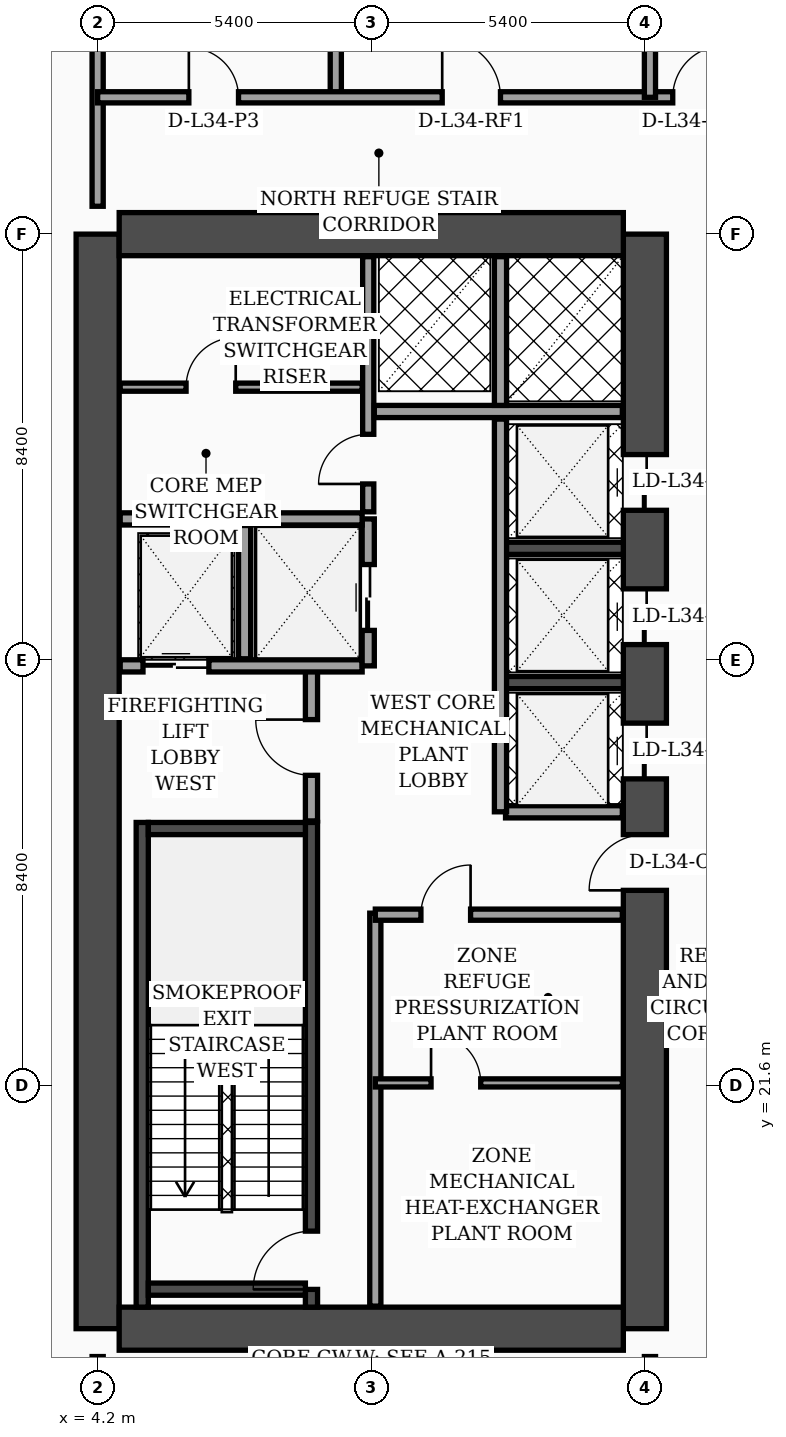
"""IFC4 building model, lengths in metres.
Left out: names, types, materials, properties, quantities, classifications, styles, units other than length and angle.
Written with IfcOpenShell. Run it as: python <this file> out.ifc"""

import sys

from ifc_helpers import new_model, si_unit, direction, frame, frame_2d, origin, place, context, subcontext, project, spatial, rectangle, extrude, element, fill, save


model = new_model("IFC4")
c1 = context("Model", 3, precision=1e-05, world=origin(), true_north=direction((0.0, 1.0)))
c2 = subcontext(c1, "Body", "Model", "MODEL_VIEW")
j1 = project(units=[si_unit("LENGTHUNIT", "METRE"), si_unit("PLANEANGLEUNIT", "RADIAN")], contexts=[c1])
p1 = place(None, origin())
s1 = spatial("IfcSite", under=j1, at=p1, CompositionType="ELEMENT")
p2 = place(p1, origin())
s2 = spatial("IfcBuilding", under=s1, at=p2, CompositionType="ELEMENT")
p3 = place(p2, frame((0.0, 0.0, 139.2)))
s3 = spatial("IfcBuildingStorey", under=s2, at=p3, CompositionType="ELEMENT", Elevation=139.2)
p4 = place(p3, frame((4.2, 16.8, 0.0), z_axis=(0.0, 0.0, 1.0), x_axis=(0.0, 1.0, 0.0)))
e1 = element("IfcWall", 1, at=p4, inside=s3, PredefinedType="SHEAR", context=c2, shape_type="SweptSolid", body=[
    extrude(rectangle(XDim=21.6, YDim=0.85, at=frame_2d((10.8, 0.0))), origin(), (0.0, 0.0, 1.0), 4.56),
])
p5 = place(p3, frame((15.0, 16.8, 0.0), z_axis=(0.0, 0.0, 1.0), x_axis=(0.0, 1.0, 0.0)))
e2 = element("IfcWall", 2, at=p5, inside=s3, PredefinedType="SHEAR", context=c2, shape_type="SweptSolid", body=[
    extrude(rectangle(XDim=21.6, YDim=0.85, at=frame_2d((10.8, 0.0))), origin(), (0.0, 0.0, 1.0), 4.56),
])
p6 = place(p5, frame((8.65, 0.0, 0.0)))
e3 = element("IfcOpeningElement", 3, at=p6, cuts=e2, PredefinedType="OPENING", context=c2, shape_type="SweptSolid", body=[
    extrude(rectangle(XDim=1.1, YDim=2.2, at=frame_2d((0.55, 1.1))), frame((0.0, 0.435, 0.0), z_axis=(0.0, -1.0, 0.0), x_axis=(1.0, 0.0, 0.0)), (0.0, 0.0, 1.0), 0.87),
])
p7 = place(p5, frame((10.85, 0.0, 0.0)))
e4 = element("IfcOpeningElement", 4, at=p7, cuts=e2, PredefinedType="OPENING", context=c2, shape_type="SweptSolid", body=[
    extrude(rectangle(XDim=1.1, YDim=2.2, at=frame_2d((0.55, 1.1))), frame((0.0, 0.435, 0.0), z_axis=(0.0, -1.0, 0.0), x_axis=(1.0, 0.0, 0.0)), (0.0, 0.0, 1.0), 0.87),
])
p8 = place(p5, frame((13.5, 0.0, 0.0)))
e5 = element("IfcOpeningElement", 5, at=p8, cuts=e2, PredefinedType="OPENING", context=c2, shape_type="SweptSolid", body=[
    extrude(rectangle(XDim=1.1, YDim=2.2, at=frame_2d((0.55, 1.1))), frame((0.0, 0.435, 0.0), z_axis=(0.0, -1.0, 0.0), x_axis=(1.0, 0.0, 0.0)), (0.0, 0.0, 1.0), 0.87),
])
p9 = place(p5, frame((16.15, 0.0, 0.0)))
e6 = element("IfcOpeningElement", 6, at=p9, cuts=e2, PredefinedType="OPENING", context=c2, shape_type="SweptSolid", body=[
    extrude(rectangle(XDim=1.1, YDim=2.2, at=frame_2d((0.55, 1.1))), frame((0.0, 0.435, 0.0), z_axis=(0.0, -1.0, 0.0), x_axis=(1.0, 0.0, 0.0)), (0.0, 0.0, 1.0), 0.87),
])
for number, where, z_axis, x_axis in (
    (7, (4.625, 38.4, 0.0), (0.0, 0.0, 1.0), (1.0, 0.0, 0.0)),
    (8, (4.625, 16.8, 0.0), (0.0, 0.0, 1.0), (1.0, 0.0, 0.0)),
):
    element("IfcWall", number, at=place(p3, frame(where, z_axis=z_axis, x_axis=x_axis)), inside=s3, PredefinedType="SHEAR", context=c2, shape_type="SweptSolid", body=[
        extrude(rectangle(XDim=9.95, YDim=0.85, at=frame_2d((4.975, 0.0))), origin(), (0.0, 0.0, 1.0), 4.56),
    ])
p10 = place(p3, frame((5.08, 17.225, 0.0), z_axis=(0.0, 0.0, 1.0), x_axis=(0.0, 1.0, 0.0)))
e9 = element("IfcWall", 9, at=p10, inside=s3, PredefinedType="SOLIDWALL", context=c2, shape_type="SweptSolid", body=[
    extrude(rectangle(XDim=9.565, YDim=0.24, at=frame_2d((4.782, 0.0))), origin(), (0.0, 0.0, 1.0), 4.56),
])
p11 = place(p3, frame((8.42, 17.225, 0.0), z_axis=(0.0, 0.0, 1.0), x_axis=(0.0, 1.0, 0.0)))
e10 = element("IfcWall", 10, at=p11, inside=s3, PredefinedType="SOLIDWALL", context=c2, shape_type="SweptSolid", body=[
    extrude(rectangle(XDim=9.565, YDim=0.24, at=frame_2d((4.782, 0.0))), origin(), (0.0, 0.0, 1.0), 4.56),
])
p12 = place(p11, frame((0.35, 0.0, 0.0)))
e11 = element("IfcOpeningElement", 11, at=p12, cuts=e10, PredefinedType="OPENING", context=c2, shape_type="SweptSolid", body=[
    extrude(rectangle(XDim=1.15, YDim=2.2, at=frame_2d((0.575, 1.1))), frame((0.0, 0.13, 0.0), z_axis=(0.0, -1.0, 0.0), x_axis=(1.0, 0.0, 0.0)), (0.0, 0.0, 1.0), 0.26),
])
for number, where, z_axis, x_axis in (
    (12, (5.2, 17.58, 0.0), (0.0, 0.0, 1.0), (1.0, 0.0, 0.0)),
    (13, (5.2, 26.67, 0.0), (0.0, 0.0, 1.0), (1.0, 0.0, 0.0)),
):
    element("IfcWall", number, at=place(p3, frame(where, z_axis=z_axis, x_axis=x_axis)), inside=s3, PredefinedType="SOLIDWALL", context=c2, shape_type="SweptSolid", body=[
        extrude(rectangle(XDim=3.1, YDim=0.24, at=frame_2d((1.55, 0.0))), origin(), (0.0, 0.0, 1.0), 4.56),
    ])
for number, where, z_axis, x_axis in (
    (14, (12.18, 29.55, 0.0), (0.0, 0.0, 1.0), (1.0, 0.0, 0.0)),
    (15, (12.18, 32.2, 0.0), (0.0, 0.0, 1.0), (1.0, 0.0, 0.0)),
):
    element("IfcWall", number, at=place(p3, frame(where, z_axis=z_axis, x_axis=x_axis)), inside=s3, PredefinedType="SOLIDWALL", context=c2, shape_type="SweptSolid", body=[
        extrude(rectangle(XDim=2.395, YDim=0.24, at=frame_2d((1.198, 0.0))), origin(), (0.0, 0.0, 1.0), 4.56),
    ])
p13 = place(p3, frame((8.42, 26.82, 0.0), z_axis=(0.0, 0.0, 1.0), x_axis=(0.0, 1.0, 0.0)))
e16 = element("IfcWall", 16, at=p13, inside=s3, PredefinedType="SOLIDWALL", context=c2, shape_type="SweptSolid", body=[
    extrude(rectangle(XDim=3.0, YDim=0.24, at=frame_2d((1.5, 0.0))), origin(), (0.0, 0.0, 1.0), 4.56),
])
p14 = place(p13, frame((0.9, 0.0, 0.0)))
e17 = element("IfcOpeningElement", 17, at=p14, cuts=e16, PredefinedType="OPENING", context=c2, shape_type="SweptSolid", body=[
    extrude(rectangle(XDim=1.1, YDim=2.2, at=frame_2d((0.55, 1.1))), frame((0.0, 0.13, 0.0), z_axis=(0.0, -1.0, 0.0), x_axis=(1.0, 0.0, 0.0)), (0.0, 0.0, 1.0), 0.26),
])
p15 = place(p3, frame((4.645, 29.88, 0.0), z_axis=(0.0, 0.0, 1.0), x_axis=(1.0, 0.0, 0.0)))
e18 = element("IfcWall", 18, at=p15, inside=s3, PredefinedType="SOLIDWALL", context=c2, shape_type="SweptSolid", body=[
    extrude(rectangle(XDim=4.775, YDim=0.24, at=frame_2d((2.387, 0.0))), origin(), (0.0, 0.0, 1.0), 4.56),
])
p16 = place(p15, frame((0.45, 0.0, 0.0)))
e19 = element("IfcOpeningElement", 19, at=p16, cuts=e18, PredefinedType="OPENING", context=c2, shape_type="SweptSolid", body=[
    extrude(rectangle(XDim=1.3, YDim=2.35, at=frame_2d((0.65, 1.175))), frame((0.0, 0.13, 0.0), z_axis=(0.0, -1.0, 0.0), x_axis=(1.0, 0.0, 0.0)), (0.0, 0.0, 1.0), 0.26),
])
p17 = place(p3, frame((7.1, 30.02, 0.0), z_axis=(0.0, 0.0, 1.0), x_axis=(0.0, 1.0, 0.0)))
e20 = element("IfcWall", 20, at=p17, inside=s3, PredefinedType="SOLIDWALL", context=c2, shape_type="SweptSolid", body=[
    extrude(rectangle(XDim=2.63, YDim=0.24, at=frame_2d((1.315, 0.0))), origin(), (0.0, 0.0, 1.0), 4.56),
])
p18 = place(p3, frame((9.54, 29.88, 0.0), z_axis=(0.0, 0.0, 1.0), x_axis=(0.0, 1.0, 0.0)))
e21 = element("IfcWall", 21, at=p18, inside=s3, PredefinedType="SOLIDWALL", context=c2, shape_type="SweptSolid", body=[
    extrude(rectangle(XDim=2.9, YDim=0.24, at=frame_2d((1.45, 0.0))), origin(), (0.0, 0.0, 1.0), 4.56),
])
p19 = place(p18, frame((0.7, 0.0, 0.0)))
e22 = element("IfcOpeningElement", 22, at=p19, cuts=e21, PredefinedType="OPENING", context=c2, shape_type="SweptSolid", body=[
    extrude(rectangle(XDim=1.3, YDim=2.35, at=frame_2d((0.65, 1.175))), frame((0.0, 0.13, 0.0), z_axis=(0.0, -1.0, 0.0), x_axis=(1.0, 0.0, 0.0)), (0.0, 0.0, 1.0), 0.26),
])
p20 = place(p3, frame((4.645, 32.78, 0.0), z_axis=(0.0, 0.0, 1.0), x_axis=(1.0, 0.0, 0.0)))
e23 = element("IfcWall", 23, at=p20, inside=s3, PredefinedType="SOLIDWALL", context=c2, shape_type="SweptSolid", body=[
    extrude(rectangle(XDim=4.775, YDim=0.24, at=frame_2d((2.387, 0.0))), origin(), (0.0, 0.0, 1.0), 4.19),
])
p21 = place(p3, frame((9.68, 17.245, 0.0), z_axis=(0.0, 0.0, 1.0), x_axis=(0.0, 1.0, 0.0)))
e24 = element("IfcWall", 24, at=p21, inside=s3, PredefinedType="SOLIDWALL", context=c2, shape_type="SweptSolid", body=[
    extrude(rectangle(XDim=7.755, YDim=0.22, at=frame_2d((3.877, 0.0))), origin(), (0.0, 0.0, 1.0), 4.56),
])
p22 = place(p3, frame((4.645, 35.38, 0.0), z_axis=(0.0, 0.0, 1.0), x_axis=(1.0, 0.0, 0.0)))
e25 = element("IfcWall", 25, at=p22, inside=s3, PredefinedType="PARTITIONING", context=c2, shape_type="SweptSolid", body=[
    extrude(rectangle(XDim=4.775, YDim=0.16, at=frame_2d((2.387, 0.0))), origin(), (0.0, 0.0, 1.0), 4.56),
])
p23 = place(p22, frame((1.3, 0.0, 0.0)))
e26 = element("IfcOpeningElement", 26, at=p23, cuts=e25, PredefinedType="OPENING", context=c2, shape_type="SweptSolid", body=[
    extrude(rectangle(XDim=0.98, YDim=2.15, at=frame_2d((0.49, 1.075))), frame((0.0, 0.09, 0.0), z_axis=(0.0, -1.0, 0.0), x_axis=(1.0, 0.0, 0.0)), (0.0, 0.0, 1.0), 0.18),
])
p24 = place(p3, frame((9.54, 32.92, 0.0), z_axis=(0.0, 0.0, 1.0), x_axis=(0.0, 1.0, 0.0)))
e27 = element("IfcWall", 27, at=p24, inside=s3, PredefinedType="SOLIDWALL", context=c2, shape_type="SweptSolid", body=[
    extrude(rectangle(XDim=5.035, YDim=0.22, at=frame_2d((2.518, 0.0))), origin(), (0.0, 0.0, 1.0), 4.56),
])
p25 = place(p24, frame((0.55, 0.0, 0.0)))
e28 = element("IfcOpeningElement", 28, at=p25, cuts=e27, PredefinedType="OPENING", context=c2, shape_type="SweptSolid", body=[
    extrude(rectangle(XDim=0.98, YDim=2.15, at=frame_2d((0.49, 1.075))), frame((0.0, 0.12, 0.0), z_axis=(0.0, -1.0, 0.0), x_axis=(1.0, 0.0, 0.0)), (0.0, 0.0, 1.0), 0.24),
])
p26 = place(p3, frame((9.68, 21.65, 0.0), z_axis=(0.0, 0.0, 1.0), x_axis=(1.0, 0.0, 0.0)))
e29 = element("IfcWall", 29, at=p26, inside=s3, PredefinedType="PARTITIONING", context=c2, shape_type="SweptSolid", body=[
    extrude(rectangle(XDim=4.875, YDim=0.16, at=frame_2d((2.438, 0.0))), origin(), (0.0, 0.0, 1.0), 4.56),
])
p27 = place(p26, frame((1.1, 0.0, 0.0)))
e30 = element("IfcOpeningElement", 30, at=p27, cuts=e29, PredefinedType="OPENING", context=c2, shape_type="SweptSolid", body=[
    extrude(rectangle(XDim=0.98, YDim=2.15, at=frame_2d((0.49, 1.075))), frame((0.0, 0.09, 0.0), z_axis=(0.0, -1.0, 0.0), x_axis=(1.0, 0.0, 0.0)), (0.0, 0.0, 1.0), 0.18),
])
p28 = place(p3, frame((9.68, 24.97, 0.0), z_axis=(0.0, 0.0, 1.0), x_axis=(1.0, 0.0, 0.0)))
e31 = element("IfcWall", 31, at=p28, inside=s3, PredefinedType="SOLIDWALL", context=c2, shape_type="SweptSolid", body=[
    extrude(rectangle(XDim=4.875, YDim=0.22, at=frame_2d((2.438, 0.0))), origin(), (0.0, 0.0, 1.0), 3.84),
])
p29 = place(p28, frame((0.9, 0.0, 0.0)))
e32 = element("IfcOpeningElement", 32, at=p29, cuts=e31, PredefinedType="OPENING", context=c2, shape_type="SweptSolid", body=[
    extrude(rectangle(XDim=0.98, YDim=2.15, at=frame_2d((0.49, 1.075))), frame((0.0, 0.12, 0.0), z_axis=(0.0, -1.0, 0.0), x_axis=(1.0, 0.0, 0.0)), (0.0, 0.0, 1.0), 0.24),
])
p30 = place(p3, frame((12.25, 27.0, 0.0), z_axis=(0.0, 0.0, 1.0), x_axis=(1.0, 0.0, 0.0)))
e33 = element("IfcWall", 33, at=p30, inside=s3, PredefinedType="SOLIDWALL", context=c2, shape_type="SweptSolid", body=[
    extrude(rectangle(XDim=2.305, YDim=0.24, at=frame_2d((1.152, 0.0))), origin(), (0.0, 0.0, 1.0), 4.56),
])
p31 = place(p3, frame((12.15, 27.0, 0.0), z_axis=(0.0, 0.0, 1.0), x_axis=(0.0, 1.0, 0.0)))
e34 = element("IfcWall", 34, at=p31, inside=s3, PredefinedType="SOLIDWALL", context=c2, shape_type="SweptSolid", body=[
    extrude(rectangle(XDim=7.75, YDim=0.24, at=frame_2d((3.875, 0.0))), origin(), (0.0, 0.0, 1.0), 4.56),
])
p32 = place(p3, frame((9.66, 34.9, 0.0), z_axis=(0.0, 0.0, 1.0), x_axis=(1.0, 0.0, 0.0)))
e35 = element("IfcWall", 35, at=p32, inside=s3, PredefinedType="SOLIDWALL", context=c2, shape_type="SweptSolid", body=[
    extrude(rectangle(XDim=4.895, YDim=0.24, at=frame_2d((2.448, 0.0))), origin(), (0.0, 0.0, 1.0), 4.56),
])
p33 = place(p3, frame((12.15, 35.02, 0.0), z_axis=(0.0, 0.0, 1.0), x_axis=(0.0, 1.0, 0.0)))
e36 = element("IfcWall", 36, at=p33, inside=s3, PredefinedType="SOLIDWALL", context=c2, shape_type="SweptSolid", body=[
    extrude(rectangle(XDim=2.935, YDim=0.24, at=frame_2d((1.468, 0.0))), origin(), (0.0, 0.0, 1.0), 4.56),
])
p34 = place(p3, frame((4.2, 4.2, 0.0), z_axis=(0.0, 0.0, 1.0), x_axis=(0.0, 1.0, 0.0)))
e37 = element("IfcWall", 37, at=p34, inside=s3, PredefinedType="SOLIDWALL", context=c2, shape_type="SweptSolid", body=[
    extrude(rectangle(XDim=12.05, YDim=0.22, at=frame_2d((6.025, 0.0))), origin(), (0.0, 0.0, 1.0), 3.84),
])
p35 = place(p3, frame((4.2, 38.95, 0.0), z_axis=(0.0, 0.0, 1.0), x_axis=(0.0, 1.0, 0.0)))
e38 = element("IfcWall", 38, at=p35, inside=s3, PredefinedType="SOLIDWALL", context=c2, shape_type="SweptSolid", body=[
    extrude(rectangle(XDim=11.99, YDim=0.22, at=frame_2d((5.995, 0.0))), origin(), (0.0, 0.0, 1.0), 3.84),
])
p36 = place(p3, frame((8.9, 41.1, 0.0), z_axis=(0.0, 0.0, 1.0), x_axis=(0.0, 1.0, 0.0)))
e39 = element("IfcWall", 39, at=p36, inside=s3, PredefinedType="SOLIDWALL", context=c2, shape_type="SweptSolid", body=[
    extrude(rectangle(XDim=9.84, YDim=0.22, at=frame_2d((4.92, 0.0))), origin(), (0.0, 0.0, 1.0), 4.04),
])
p37 = place(p3, frame((4.2, 41.1, 0.0), z_axis=(0.0, 0.0, 1.0), x_axis=(1.0, 0.0, 0.0)))
e40 = element("IfcWall", 40, at=p37, inside=s3, PredefinedType="SOLIDWALL", context=c2, shape_type="SweptSolid", body=[
    extrude(rectangle(XDim=13.65, YDim=0.22, at=frame_2d((6.825, 0.0))), origin(), (0.0, 0.0, 1.0), 3.84),
])
p38 = place(p37, frame((1.8, 0.0, 0.0)))
e41 = element("IfcOpeningElement", 41, at=p38, cuts=e40, PredefinedType="OPENING", context=c2, shape_type="SweptSolid", body=[
    extrude(rectangle(XDim=0.98, YDim=2.15, at=frame_2d((0.49, 1.075))), frame((0.0, 0.12, 0.0), z_axis=(0.0, -1.0, 0.0), x_axis=(1.0, 0.0, 0.0)), (0.0, 0.0, 1.0), 0.24),
])
p39 = place(p37, frame((6.8, 0.0, 0.0)))
e42 = element("IfcOpeningElement", 42, at=p39, cuts=e40, PredefinedType="OPENING", context=c2, shape_type="SweptSolid", body=[
    extrude(rectangle(XDim=1.15, YDim=2.2, at=frame_2d((0.575, 1.1))), frame((0.0, 0.12, 0.0), z_axis=(0.0, -1.0, 0.0), x_axis=(1.0, 0.0, 0.0)), (0.0, 0.0, 1.0), 0.24),
])
p40 = place(p37, frame((11.35, 0.0, 0.0)))
e43 = element("IfcOpeningElement", 43, at=p40, cuts=e40, PredefinedType="OPENING", context=c2, shape_type="SweptSolid", body=[
    extrude(rectangle(XDim=1.02, YDim=2.2, at=frame_2d((0.51, 1.1))), frame((0.0, 0.12, 0.0), z_axis=(0.0, -1.0, 0.0), x_axis=(1.0, 0.0, 0.0)), (0.0, 0.0, 1.0), 0.24),
])
p41 = place(p3, frame((15.1, 41.1, 0.0), z_axis=(0.0, 0.0, 1.0), x_axis=(0.0, 1.0, 0.0)))
e44 = element("IfcWall", 44, at=p41, inside=s3, PredefinedType="SOLIDWALL", context=c2, shape_type="SweptSolid", body=[
    extrude(rectangle(XDim=6.7, YDim=0.22, at=frame_2d((3.35, 0.0))), origin(), (0.0, 0.0, 1.0), 3.84),
])
p42 = place(p3, frame((15.1, 4.2, 0.0), z_axis=(0.0, 0.0, 1.0), x_axis=(0.0, 1.0, 0.0)))
e45 = element("IfcWall", 45, at=p42, inside=s3, PredefinedType="SOLIDWALL", context=c2, shape_type="SweptSolid", body=[
    extrude(rectangle(XDim=12.05, YDim=0.22, at=frame_2d((6.025, 0.0))), origin(), (0.0, 0.0, 1.0), 3.49),
])
p43 = place(p42, frame((10.2, 0.0, 0.0)))
e46 = element("IfcOpeningElement", 46, at=p43, cuts=e45, PredefinedType="OPENING", context=c2, shape_type="SweptSolid", body=[
    extrude(rectangle(XDim=1.6, YDim=2.35, at=frame_2d((0.8, 1.175))), frame((0.0, 0.12, 0.0), z_axis=(0.0, -1.0, 0.0), x_axis=(1.0, 0.0, 0.0)), (0.0, 0.0, 1.0), 0.24),
])
p44 = place(p14, origin())
e47 = element("IfcDoor", 47, at=p44, inside=s3, OperationType="SINGLE_SWING_RIGHT", PredefinedType="DOOR", context=c2, shape_type="SweptSolid", body=[
    extrude(rectangle(XDim=1.1, YDim=2.2, at=frame_2d((0.55, 1.1))), frame((0.0, 0.025, 0.0), z_axis=(0.0, -1.0, 0.0), x_axis=(1.0, 0.0, 0.0)), (0.0, 0.0, 1.0), 0.05),
])
fill(e17, e47)
p45 = place(p16, origin())
e48 = element("IfcDoor", 48, at=p45, inside=s3, OperationType="DOUBLE_DOOR_SLIDING", PredefinedType="DOOR", context=c2, shape_type="SweptSolid", body=[
    extrude(rectangle(XDim=1.3, YDim=2.35, at=frame_2d((0.65, 1.175))), frame((0.0, 0.025, 0.0), z_axis=(0.0, -1.0, 0.0), x_axis=(1.0, 0.0, 0.0)), (0.0, 0.0, 1.0), 0.05),
])
fill(e19, e48)
p46 = place(p19, origin())
e49 = element("IfcDoor", 49, at=p46, inside=s3, OperationType="DOUBLE_DOOR_SLIDING", PredefinedType="DOOR", context=c2, shape_type="SweptSolid", body=[
    extrude(rectangle(XDim=1.3, YDim=2.35, at=frame_2d((0.65, 1.175))), frame((0.0, 0.025, 0.0), z_axis=(0.0, -1.0, 0.0), x_axis=(1.0, 0.0, 0.0)), (0.0, 0.0, 1.0), 0.05),
])
fill(e22, e49)
p47 = place(p23, origin())
e50 = element("IfcDoor", 50, at=p47, inside=s3, OperationType="SINGLE_SWING_RIGHT", PredefinedType="DOOR", context=c2, shape_type="SweptSolid", body=[
    extrude(rectangle(XDim=0.98, YDim=2.15, at=frame_2d((0.49, 1.075))), frame((0.0, 0.025, 0.0), z_axis=(0.0, -1.0, 0.0), x_axis=(1.0, 0.0, 0.0)), (0.0, 0.0, 1.0), 0.05),
])
fill(e26, e50)
p48 = place(p25, origin())
e51 = element("IfcDoor", 51, at=p48, inside=s3, OperationType="SINGLE_SWING_LEFT", PredefinedType="DOOR", context=c2, shape_type="SweptSolid", body=[
    extrude(rectangle(XDim=0.98, YDim=2.15, at=frame_2d((0.49, 1.075))), frame((0.0, 0.025, 0.0), z_axis=(0.0, -1.0, 0.0), x_axis=(1.0, 0.0, 0.0)), (0.0, 0.0, 1.0), 0.05),
])
fill(e28, e51)
p49 = place(p27, origin())
e52 = element("IfcDoor", 52, at=p49, inside=s3, OperationType="SINGLE_SWING_LEFT", PredefinedType="DOOR", context=c2, shape_type="SweptSolid", body=[
    extrude(rectangle(XDim=0.98, YDim=2.15, at=frame_2d((0.49, 1.075))), frame((0.0, 0.025, 0.0), z_axis=(0.0, -1.0, 0.0), x_axis=(1.0, 0.0, 0.0)), (0.0, 0.0, 1.0), 0.05),
])
fill(e30, e52)
p50 = place(p29, origin())
e53 = element("IfcDoor", 53, at=p50, inside=s3, OperationType="SINGLE_SWING_RIGHT", PredefinedType="DOOR", context=c2, shape_type="SweptSolid", body=[
    extrude(rectangle(XDim=0.98, YDim=2.15, at=frame_2d((0.49, 1.075))), frame((0.0, 0.025, 0.0), z_axis=(0.0, -1.0, 0.0), x_axis=(1.0, 0.0, 0.0)), (0.0, 0.0, 1.0), 0.05),
])
fill(e32, e53)
p51 = place(p38, origin())
e54 = element("IfcDoor", 54, at=p51, inside=s3, OperationType="SINGLE_SWING_LEFT", PredefinedType="DOOR", context=c2, shape_type="SweptSolid", body=[
    extrude(rectangle(XDim=0.98, YDim=2.15, at=frame_2d((0.49, 1.075))), frame((0.0, 0.025, 0.0), z_axis=(0.0, -1.0, 0.0), x_axis=(1.0, 0.0, 0.0)), (0.0, 0.0, 1.0), 0.05),
])
fill(e41, e54)
p52 = place(p39, origin())
e55 = element("IfcDoor", 55, at=p52, inside=s3, OperationType="SINGLE_SWING_LEFT", PredefinedType="DOOR", context=c2, shape_type="SweptSolid", body=[
    extrude(rectangle(XDim=1.15, YDim=2.2, at=frame_2d((0.575, 1.1))), frame((0.0, 0.025, 0.0), z_axis=(0.0, -1.0, 0.0), x_axis=(1.0, 0.0, 0.0)), (0.0, 0.0, 1.0), 0.05),
])
fill(e42, e55)
p53 = place(p40, origin())
e56 = element("IfcDoor", 56, at=p53, inside=s3, OperationType="SINGLE_SWING_RIGHT", PredefinedType="DOOR", context=c2, shape_type="SweptSolid", body=[
    extrude(rectangle(XDim=1.02, YDim=2.2, at=frame_2d((0.51, 1.1))), frame((0.0, 0.025, 0.0), z_axis=(0.0, -1.0, 0.0), x_axis=(1.0, 0.0, 0.0)), (0.0, 0.0, 1.0), 0.05),
])
fill(e43, e56)
p54 = place(p12, origin())
e57 = element("IfcDoor", 57, at=p54, inside=s3, OperationType="SINGLE_SWING_LEFT", PredefinedType="DOOR", context=c2, shape_type="SweptSolid", body=[
    extrude(rectangle(XDim=1.15, YDim=2.2, at=frame_2d((0.575, 1.1))), frame((0.0, 0.025, 0.0), z_axis=(0.0, -1.0, 0.0), x_axis=(1.0, 0.0, 0.0)), (0.0, 0.0, 1.0), 0.05),
])
fill(e11, e57)
p55 = place(p6, origin())
e58 = element("IfcDoor", 58, at=p55, inside=s3, OperationType="SINGLE_SWING_LEFT", PredefinedType="DOOR", context=c2, shape_type="SweptSolid", body=[
    extrude(rectangle(XDim=1.1, YDim=2.2, at=frame_2d((0.55, 1.1))), frame((0.0, 0.025, 0.0), z_axis=(0.0, -1.0, 0.0), x_axis=(1.0, 0.0, 0.0)), (0.0, 0.0, 1.0), 0.05),
])
fill(e3, e58)
p56 = place(p7, origin())
e59 = element("IfcDoor", 59, at=p56, inside=s3, OperationType="DOUBLE_DOOR_SLIDING", PredefinedType="DOOR", context=c2, shape_type="SweptSolid", body=[
    extrude(rectangle(XDim=1.1, YDim=2.2, at=frame_2d((0.55, 1.1))), frame((0.0, 0.025, 0.0), z_axis=(0.0, -1.0, 0.0), x_axis=(1.0, 0.0, 0.0)), (0.0, 0.0, 1.0), 0.05),
])
fill(e4, e59)
p57 = place(p8, origin())
e60 = element("IfcDoor", 60, at=p57, inside=s3, OperationType="DOUBLE_DOOR_SLIDING", PredefinedType="DOOR", context=c2, shape_type="SweptSolid", body=[
    extrude(rectangle(XDim=1.1, YDim=2.2, at=frame_2d((0.55, 1.1))), frame((0.0, 0.025, 0.0), z_axis=(0.0, -1.0, 0.0), x_axis=(1.0, 0.0, 0.0)), (0.0, 0.0, 1.0), 0.05),
])
fill(e5, e60)
p58 = place(p9, origin())
e61 = element("IfcDoor", 61, at=p58, inside=s3, OperationType="DOUBLE_DOOR_SLIDING", PredefinedType="DOOR", context=c2, shape_type="SweptSolid", body=[
    extrude(rectangle(XDim=1.1, YDim=2.2, at=frame_2d((0.55, 1.1))), frame((0.0, 0.025, 0.0), z_axis=(0.0, -1.0, 0.0), x_axis=(1.0, 0.0, 0.0)), (0.0, 0.0, 1.0), 0.05),
])
fill(e6, e61)
save(model, sys.argv[1])
